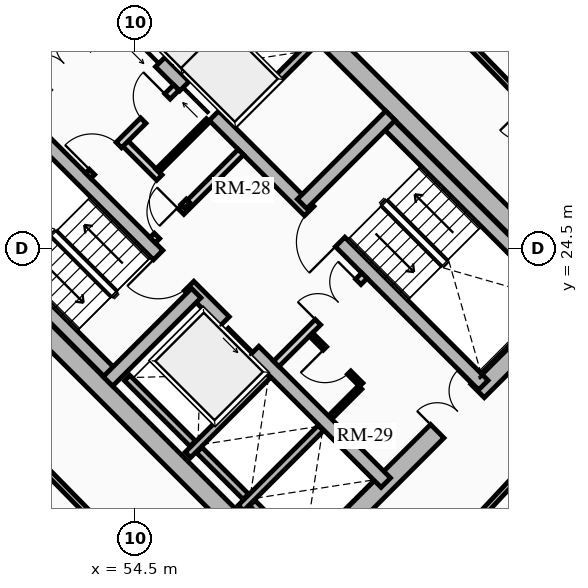
"""IFC4 building model, lengths in metres.
Left out: names, types, materials, properties, quantities, classifications, styles, units other than length and angle.
Written with IfcOpenShell. Run it as: python <this file> out.ifc"""

import sys

from ifc_helpers import new_model, si_unit, direction, frame, frame_2d, origin, place, context, subcontext, project, spatial, rectangle, extrude, source, transform, mapped, element, fill, save


model = new_model("IFC4")
c1 = context("Model", 3, precision=1e-05, world=origin(), true_north=direction((0.0, 1.0)))
c2 = subcontext(c1, "Body", "Model", "MODEL_VIEW")
j1 = project(units=[si_unit("LENGTHUNIT", "METRE"), si_unit("PLANEANGLEUNIT", "RADIAN")], contexts=[c1])
p1 = place(None, origin())
s1 = spatial("IfcSite", under=j1, at=p1, CompositionType="ELEMENT")
p2 = place(p1, origin())
s2 = spatial("IfcBuilding", under=s1, at=p2, CompositionType="ELEMENT")
p3 = place(p2, frame((0.0, 0.0, 51.1)))
s3 = spatial("IfcBuildingStorey", under=s2, at=p3, CompositionType="ELEMENT", Elevation=51.1)
for number, where, z_axis, x_axis in (
    (1, (58.773, 15.661, 0.0), (0.0, 0.0, 1.0), (-0.707, 0.707, 0.0)),
    (2, (66.339, 23.227, 0.0), (0.0, 0.0, 1.0), (-0.707, 0.707, 0.0)),
):
    element("IfcWall", number, at=place(p3, frame(where, z_axis=z_axis, x_axis=x_axis)), inside=s3, PredefinedType="SHEAR", context=c2, shape_type="SweptSolid", body=[
        extrude(rectangle(XDim=14.3, YDim=0.5, at=frame_2d((7.15, 0.0))), origin(), (0.0, 0.0, 1.0), 2.91),
    ])
p4 = place(p3, frame((58.596, 15.838, 0.0), z_axis=(0.0, 0.0, 1.0), x_axis=(0.707106781187, 0.707106781187, 0.0)))
e3 = element("IfcWall", 3, at=p4, inside=s3, PredefinedType="SHEAR", context=c2, shape_type="SweptSolid", body=[
    extrude(rectangle(XDim=10.7, YDim=0.5, at=frame_2d((5.35, 0.0))), origin(), (0.0, 0.0, 1.0), 2.91),
])
m1 = source(origin(), c2, "Body", "SweptSolid", [
    extrude(rectangle(XDim=1.5, YDim=2.02, at=frame_2d((0.75, 1.01))), frame((0.0, 0.26, 0.0), z_axis=(0.0, -1.0, 0.0), x_axis=(1.0, 0.0, 0.0)), (0.0, 0.0, 1.0), 0.52),
])
p5 = place(p4, frame((5.45, 0.0, 0.0)))
e4 = element("IfcOpeningElement", 4, at=p5, cuts=e3, PredefinedType="OPENING", context=c2, shape_type="MappedRepresentation", body=[
    mapped(m1, transform((0.0, 0.0, 0.0), x_axis=(1.0, 0.0, 0.0), y_axis=(0.0, 1.0, 0.0), z_axis=(0.0, 0.0, 1.0), scale=1.0)),
])
p6 = place(p3, frame((48.838, 25.596, 0.0), z_axis=(0.0, 0.0, 1.0), x_axis=(0.707106781187, 0.707106781187, 0.0)))
e5 = element("IfcWall", 5, at=p6, inside=s3, PredefinedType="SHEAR", context=c2, shape_type="SweptSolid", body=[
    extrude(rectangle(XDim=10.7, YDim=0.5, at=frame_2d((5.35, 0.0))), origin(), (0.0, 0.0, 1.0), 2.91),
])
p7 = place(p6, frame((4.6, 0.0, 0.0)))
e6 = element("IfcOpeningElement", 6, at=p7, cuts=e5, PredefinedType="OPENING", context=c2, shape_type="MappedRepresentation", body=[
    mapped(m1, transform((0.0, 0.0, 0.0), x_axis=(1.0, 0.0, 0.0), y_axis=(0.0, 1.0, 0.0), z_axis=(0.0, 0.0, 1.0), scale=1.0)),
])
p8 = place(p3, frame((61.096, 18.338, 0.0), z_axis=(0.0, 0.0, 1.0), x_axis=(-0.707106781187, 0.707106781187, 0.0)))
e7 = element("IfcWall", 7, at=p8, inside=s3, PredefinedType="SHEAR", context=c2, shape_type="SweptSolid", body=[
    extrude(rectangle(XDim=13.8, YDim=0.35, at=frame_2d((6.9, 0.0))), origin(), (0.0, 0.0, 1.0), 2.91),
])
m2 = source(origin(), c2, "Body", "SweptSolid", [
    extrude(rectangle(XDim=1.1, YDim=2.015, at=frame_2d((0.55, 1.007))), frame((0.0, 0.185, 0.0), z_axis=(0.0, -1.0, 0.0), x_axis=(1.0, 0.0, 0.0)), (0.0, 0.0, 1.0), 0.37),
])
p9 = place(p8, frame((4.9, 0.0, 0.0)))
e8 = element("IfcOpeningElement", 8, at=p9, cuts=e7, PredefinedType="OPENING", context=c2, shape_type="MappedRepresentation", body=[
    mapped(m2, transform((0.0, 0.0, 0.0), x_axis=(1.0, 0.0, 0.0), y_axis=(0.0, 1.0, 0.0), z_axis=(0.0, 0.0, 1.0), scale=1.0)),
])
m3 = source(origin(), c2, "Body", "SweptSolid", [
    extrude(rectangle(XDim=1.15, YDim=2.02, at=frame_2d((0.575, 1.01))), frame((0.0, 0.185, 0.0), z_axis=(0.0, -1.0, 0.0), x_axis=(1.0, 0.0, 0.0)), (0.0, 0.0, 1.0), 0.37),
])
p10 = place(p8, frame((7.32, 0.0, 0.0)))
e9 = element("IfcOpeningElement", 9, at=p10, cuts=e7, PredefinedType="OPENING", context=c2, shape_type="MappedRepresentation", body=[
    mapped(m3, transform((0.0, 0.0, 0.0), x_axis=(1.0, 0.0, 0.0), y_axis=(0.0, 1.0, 0.0), z_axis=(0.0, 0.0, 1.0), scale=1.0)),
])
p11 = place(p3, frame((63.662, 20.904, 0.0), z_axis=(0.0, 0.0, 1.0), x_axis=(-0.707106781187, 0.707106781187, 0.0)))
e10 = element("IfcWall", 10, at=p11, inside=s3, PredefinedType="SHEAR", context=c2, shape_type="SweptSolid", body=[
    extrude(rectangle(XDim=13.8, YDim=0.35, at=frame_2d((6.9, 0.0))), origin(), (0.0, 0.0, 1.0), 2.91),
])
p12 = place(p11, frame((10.025, 0.0, 0.0)))
e11 = element("IfcOpeningElement", 11, at=p12, cuts=e10, PredefinedType="OPENING", context=c2, shape_type="MappedRepresentation", body=[
    mapped(m2, transform((0.0, 0.0, 0.0), x_axis=(1.0, 0.0, 0.0), y_axis=(0.0, 1.0, 0.0), z_axis=(0.0, 0.0, 1.0), scale=1.0)),
])
p13 = place(p11, frame((12.025, 0.0, 0.0)))
e12 = element("IfcOpeningElement", 12, at=p13, cuts=e10, PredefinedType="OPENING", context=c2, shape_type="MappedRepresentation", body=[
    mapped(m2, transform((0.0, 0.0, 0.0), x_axis=(1.0, 0.0, 0.0), y_axis=(0.0, 1.0, 0.0), z_axis=(0.0, 0.0, 1.0), scale=1.0)),
])
p14 = place(p11, frame((5.33, 0.0, 0.0)))
e13 = element("IfcOpeningElement", 13, at=p14, cuts=e10, PredefinedType="OPENING", context=c2, shape_type="MappedRepresentation", body=[
    mapped(m3, transform((0.0, 0.0, 0.0), x_axis=(1.0, 0.0, 0.0), y_axis=(0.0, 1.0, 0.0), z_axis=(0.0, 0.0, 1.0), scale=1.0)),
])
p15 = place(p3, frame((53.922, 21.141, 0.0), z_axis=(0.0, 0.0, 1.0), x_axis=(-0.707106781187, 0.707106781187, 0.0)))
e14 = element("IfcWall", 14, at=p15, inside=s3, PredefinedType="SHEAR", context=c2, shape_type="SweptSolid", body=[
    extrude(rectangle(XDim=6.745, YDim=0.35, at=frame_2d((3.373, 0.0))), origin(), (0.0, 0.0, 1.0), 2.91),
])
p16 = place(p3, frame((53.784, 21.003, 0.0), z_axis=(0.0, 0.0, 1.0), x_axis=(0.707106781187, 0.707106781187, 0.0)))
e15 = element("IfcWall", 15, at=p16, inside=s3, PredefinedType="SHEAR", context=c2, shape_type="SweptSolid", body=[
    extrude(rectangle(XDim=3.285, YDim=0.35, at=frame_2d((1.643, 0.0))), origin(), (0.0, 0.0, 1.0), 2.91),
])
p17 = place(p3, frame((65.847, 23.089, 0.0), z_axis=(0.0, 0.0, 1.0), x_axis=(-0.707106781187, 0.707106781187, 0.0)))
e16 = element("IfcWall", 16, at=p17, inside=s3, PredefinedType="SHEAR", context=c2, shape_type="SweptSolid", body=[
    extrude(rectangle(XDim=6.745, YDim=0.35, at=frame_2d((3.373, 0.0))), origin(), (0.0, 0.0, 1.0), 2.91),
])
p18 = place(p3, frame((58.893, 25.674, 0.0), z_axis=(0.0, 0.0, 1.0), x_axis=(0.707106781187, 0.707106781187, 0.0)))
e17 = element("IfcWall", 17, at=p18, inside=s3, PredefinedType="SHEAR", context=c2, shape_type="SweptSolid", body=[
    extrude(rectangle(XDim=3.285, YDim=0.35, at=frame_2d((1.643, 0.0))), origin(), (0.0, 0.0, 1.0), 2.91),
])
p19 = place(p3, frame((55.888, 19.069, 0.0), z_axis=(0.0, 0.0, 1.0), x_axis=(0.707106781187, 0.707106781187, 0.0)))
e18 = element("IfcWall", 18, at=p19, inside=s3, PredefinedType="SHEAR", context=c2, shape_type="SweptSolid", body=[
    extrude(rectangle(XDim=2.97, YDim=0.2, at=frame_2d((1.485, 0.0))), origin(), (0.0, 0.0, 1.0), 2.91),
])
p20 = place(p3, frame((56.015, 19.366, 0.0), z_axis=(0.0, 0.0, 1.0), x_axis=(-0.707106781187, 0.707106781187, 0.0)))
e19 = element("IfcWall", 19, at=p20, inside=s3, PredefinedType="SHEAR", context=c2, shape_type="SweptSolid", body=[
    extrude(rectangle(XDim=2.44, YDim=0.2, at=frame_2d((1.22, 0.0))), origin(), (0.0, 0.0, 1.0), 2.91),
])
p21 = place(p3, frame((57.284, 17.673, 0.0), z_axis=(0.0, 0.0, 1.0), x_axis=(0.707147878904, 0.70706568108, 0.0)))
e20 = element("IfcWall", 20, at=p21, inside=s3, PredefinedType="SHEAR", context=c2, shape_type="SweptSolid", body=[
    extrude(rectangle(XDim=2.97, YDim=0.2, at=frame_2d((1.485, 0.0))), origin(), (0.0, 0.0, 1.0), 2.91),
])
p22 = place(p3, frame((57.412, 17.97, 0.0), z_axis=(0.0, 0.0, 1.0), x_axis=(-0.707106781187, 0.707106781187, 0.0)))
e21 = element("IfcWall", 21, at=p22, inside=s3, PredefinedType="SHEAR", context=c2, shape_type="SweptSolid", body=[
    extrude(rectangle(XDim=1.735, YDim=0.2, at=frame_2d((0.867, 0.0))), origin(), (0.0, 0.0, 1.0), 2.91),
])
p23 = place(p3, frame((58.737, 16.644, 0.0), z_axis=(0.0, 0.0, 1.0), x_axis=(-0.707032117043, 0.707181437447, 0.0)))
e22 = element("IfcWall", 22, at=p23, inside=s3, PredefinedType="SHEAR", context=c2, shape_type="SweptSolid", body=[
    extrude(rectangle(XDim=1.635, YDim=0.2, at=frame_2d((0.817, 0.0))), origin(), (0.0, 0.0, 1.0), 2.91),
])
p24 = place(p3, frame((57.062, 27.781, 0.0), z_axis=(0.0, 0.0, 1.0), x_axis=(0.707106781187, 0.707106781187, 0.0)))
e23 = element("IfcWall", 23, at=p24, inside=s3, PredefinedType="SHEAR", context=c2, shape_type="SweptSolid", body=[
    extrude(rectangle(XDim=2.97, YDim=0.2, at=frame_2d((1.485, 0.0))), origin(), (0.0, 0.0, 1.0), 2.91),
])
p25 = place(p3, frame((55.615, 29.227, 0.0), z_axis=(0.0, 0.0, 1.0), x_axis=(0.707147878904, 0.70706568108, 0.0)))
e24 = element("IfcWall", 24, at=p25, inside=s3, PredefinedType="SHEAR", context=c2, shape_type="SweptSolid", body=[
    extrude(rectangle(XDim=2.97, YDim=0.2, at=frame_2d((1.485, 0.0))), origin(), (0.0, 0.0, 1.0), 2.91),
])
p26 = place(p3, frame((58.214, 21.467, 0.0), z_axis=(0.0, 0.0, 1.0), x_axis=(0.707106781187, 0.707106781187, 0.0)))
e25 = element("IfcWall", 25, at=p26, inside=s3, PredefinedType="PARTITIONING", context=c2, shape_type="SweptSolid", body=[
    extrude(rectangle(XDim=3.28, YDim=0.2, at=frame_2d((1.64, 0.0))), origin(), (0.0, 0.0, 1.0), 2.635),
])
m4 = source(origin(), c2, "Body", "SweptSolid", [
    extrude(rectangle(XDim=1.5, YDim=2.02, at=frame_2d((0.75, 1.01))), frame((0.0, 0.11, 0.0), z_axis=(0.0, -1.0, 0.0), x_axis=(1.0, 0.0, 0.0)), (0.0, 0.0, 1.0), 0.22),
])
p27 = place(p26, frame((1.55, 0.0, 0.0)))
e26 = element("IfcOpeningElement", 26, at=p27, cuts=e25, PredefinedType="OPENING", context=c2, shape_type="MappedRepresentation", body=[
    mapped(m4, transform((0.0, 0.0, 0.0), x_axis=(1.0, 0.0, 0.0), y_axis=(0.0, 1.0, 0.0), z_axis=(0.0, 0.0, 1.0), scale=1.0)),
])
p28 = place(p3, frame((54.961, 24.719, 0.0), z_axis=(0.0, 0.0, 1.0), x_axis=(0.707106781187, 0.707106781187, 0.0)))
e27 = element("IfcWall", 27, at=p28, inside=s3, PredefinedType="PARTITIONING", context=c2, shape_type="SweptSolid", body=[
    extrude(rectangle(XDim=3.28, YDim=0.2, at=frame_2d((1.64, 0.0))), origin(), (0.0, 0.0, 1.0), 2.635),
])
m5 = source(origin(), c2, "Body", "SweptSolid", [
    extrude(rectangle(XDim=0.9, YDim=2.005, at=frame_2d((0.45, 1.002))), frame((0.0, 0.11, 0.0), z_axis=(0.0, -1.0, 0.0), x_axis=(1.0, 0.0, 0.0)), (0.0, 0.0, 1.0), 0.22),
])
p29 = place(p28, frame((0.16, 0.0, 0.0)))
e28 = element("IfcOpeningElement", 28, at=p29, cuts=e27, PredefinedType="OPENING", context=c2, shape_type="MappedRepresentation", body=[
    mapped(m5, transform((0.0, 0.0, 0.0), x_axis=(1.0, 0.0, 0.0), y_axis=(0.0, 1.0, 0.0), z_axis=(0.0, 0.0, 1.0), scale=1.0)),
])
p30 = place(p3, frame((55.874, 25.631, 0.0), z_axis=(0.0, 0.0, 1.0), x_axis=(-0.707157639372, 0.707055919343, 0.0)))
e29 = element("IfcWall", 29, at=p30, inside=s3, PredefinedType="PARTITIONING", context=c2, shape_type="SweptSolid", body=[
    extrude(rectangle(XDim=2.4, YDim=0.2, at=frame_2d((1.2, 0.0))), origin(), (0.0, 0.0, 1.0), 2.635),
])
p31 = place(p30, frame((0.14, 0.0, 0.0)))
e30 = element("IfcOpeningElement", 30, at=p31, cuts=e29, PredefinedType="OPENING", context=c2, shape_type="MappedRepresentation", body=[
    mapped(m5, transform((0.0, 0.0, 0.0), x_axis=(1.0, 0.0, 0.0), y_axis=(0.0, 1.0, 0.0), z_axis=(0.0, 0.0, 1.0), scale=1.0)),
])
p32 = place(p3, frame((53.264, 26.416, 0.0), z_axis=(0.0, 0.0, 1.0), x_axis=(0.707106781187, 0.707106781187, 0.0)))
e31 = element("IfcWall", 31, at=p32, inside=s3, PredefinedType="PARTITIONING", context=c2, shape_type="SweptSolid", body=[
    extrude(rectangle(XDim=3.28, YDim=0.2, at=frame_2d((1.64, 0.0))), origin(), (0.0, 0.0, 1.0), 2.635),
])
m6 = source(origin(), c2, "Body", "SweptSolid", [
    extrude(rectangle(XDim=1.0, YDim=2.015, at=frame_2d((0.5, 1.007))), frame((0.0, 0.11, 0.0), z_axis=(0.0, -1.0, 0.0), x_axis=(1.0, 0.0, 0.0)), (0.0, 0.0, 1.0), 0.22),
])
p33 = place(p32, frame((0.14, 0.0, 0.0)))
e32 = element("IfcOpeningElement", 32, at=p33, cuts=e31, PredefinedType="OPENING", context=c2, shape_type="MappedRepresentation", body=[
    mapped(m6, transform((0.0, 0.0, 0.0), x_axis=(1.0, 0.0, 0.0), y_axis=(0.0, 1.0, 0.0), z_axis=(0.0, 0.0, 1.0), scale=1.0)),
])
p34 = place(p32, frame((2.05, 0.0, 0.0)))
e33 = element("IfcOpeningElement", 33, at=p34, cuts=e31, PredefinedType="OPENING", context=c2, shape_type="MappedRepresentation", body=[
    mapped(m5, transform((0.0, 0.0, 0.0), x_axis=(1.0, 0.0, 0.0), y_axis=(0.0, 1.0, 0.0), z_axis=(0.0, 0.0, 1.0), scale=1.0)),
])
p35 = place(p3, frame((60.448, 20.915, 0.0), z_axis=(0.0, 0.0, 1.0), x_axis=(-0.707106781187, 0.707106781187, 0.0)))
e34 = element("IfcWall", 34, at=p35, inside=s3, PredefinedType="PARTITIONING", context=c2, shape_type="SweptSolid", body=[
    extrude(rectangle(XDim=1.87, YDim=0.125, at=frame_2d((0.935, 0.0))), origin(), (0.0, 0.0, 1.0), 2.635),
])
m7 = source(origin(), c2, "Body", "SweptSolid", [
    extrude(rectangle(XDim=0.9, YDim=2.005, at=frame_2d((0.45, 1.002))), frame((0.0, 0.073, 0.0), z_axis=(0.0, -1.0, 0.0), x_axis=(1.0, 0.0, 0.0)), (0.0, 0.0, 1.0), 0.145),
])
p36 = place(p35, frame((0.45, 0.0, 0.0)))
e35 = element("IfcOpeningElement", 35, at=p36, cuts=e34, PredefinedType="OPENING", context=c2, shape_type="MappedRepresentation", body=[
    mapped(m7, transform((0.0, 0.0, 0.0), x_axis=(1.0, 0.0, 0.0), y_axis=(0.0, 1.0, 0.0), z_axis=(0.0, 0.0, 1.0), scale=1.0)),
])
p37 = place(p3, frame((59.643, 20.066, 0.0), z_axis=(0.0, 0.0, 1.0), x_axis=(0.707106781187, 0.707106781187, 0.0)))
e36 = element("IfcWall", 36, at=p37, inside=s3, PredefinedType="PARTITIONING", context=c2, shape_type="SweptSolid", body=[
    extrude(rectangle(XDim=1.1, YDim=0.125, at=frame_2d((0.55, 0.0))), origin(), (0.0, 0.0, 1.0), 2.635),
])
p38 = place(p3, frame((55.089, 26.543, 0.0), z_axis=(0.0, 0.0, 1.0), x_axis=(0.707106781187, 0.707106781187, 0.0)))
e37 = element("IfcWall", 37, at=p38, inside=s3, PredefinedType="PARTITIONING", context=c2, shape_type="SweptSolid", body=[
    extrude(rectangle(XDim=1.88, YDim=0.125, at=frame_2d((0.94, 0.0))), origin(), (0.0, 0.0, 1.0), 2.635),
])
p39 = place(p3, frame((51.914, 18.914, 0.0), z_axis=(0.0, 0.0, 1.0), x_axis=(0.6999614951, -0.71418058317, 0.0)))
e38 = element("IfcWall", 38, at=p39, inside=s3, PredefinedType="PARTITIONING", context=c2, shape_type="SweptSolid", body=[
    extrude(rectangle(XDim=6.13, YDim=0.15, at=frame_2d((3.065, 0.0))), origin(), (0.0, 0.0, 1.0), 2.159),
])
m8 = source(origin(), c2, "Body", "SweptSolid", [
    extrude(rectangle(XDim=1.05, YDim=2.015, at=frame_2d((0.525, 1.007))), frame((0.0, 0.085, 0.0), z_axis=(0.0, -1.0, 0.0), x_axis=(1.0, 0.0, 0.0)), (0.0, 0.0, 1.0), 0.17),
])
p40 = place(p39, frame((2.54, 0.0, 0.0)))
e39 = element("IfcOpeningElement", 39, at=p40, cuts=e38, PredefinedType="OPENING", context=c2, shape_type="MappedRepresentation", body=[
    mapped(m8, transform((0.0, 0.0, 0.0), x_axis=(1.0, 0.0, 0.0), y_axis=(0.0, 1.0, 0.0), z_axis=(0.0, 0.0, 1.0), scale=1.0)),
])
p41 = place(p3, frame((62.867, 16.702, 0.0), z_axis=(0.0, 0.0, 1.0), x_axis=(0.682449206191, 0.73093302085, 0.0)))
e40 = element("IfcWall", 40, at=p41, inside=s3, PredefinedType="PARTITIONING", context=c2, shape_type="SweptSolid", body=[
    extrude(rectangle(XDim=6.642, YDim=0.15, at=frame_2d((3.321, 0.0))), origin(), (0.0, 0.0, 1.0), 2.159),
])
p42 = place(p3, frame((67.247, 25.802, 0.0), z_axis=(0.0, 0.0, 1.0), x_axis=(-0.696771261687, 0.71729339108, 0.0)))
e41 = element("IfcWall", 41, at=p42, inside=s3, PredefinedType="PARTITIONING", context=c2, shape_type="SweptSolid", body=[
    extrude(rectangle(XDim=5.972, YDim=0.15, at=frame_2d((2.986, 0.0))), origin(), (0.0, 0.0, 1.0), 2.635),
])
m9 = source(origin(), c2, "Body", "SweptSolid", [
    extrude(rectangle(XDim=1.0, YDim=2.015, at=frame_2d((0.5, 1.007))), frame((0.0, 0.085, 0.0), z_axis=(0.0, -1.0, 0.0), x_axis=(1.0, 0.0, 0.0)), (0.0, 0.0, 1.0), 0.17),
])
p43 = place(p42, frame((2.486, 0.0, 0.0)))
e42 = element("IfcOpeningElement", 42, at=p43, cuts=e41, PredefinedType="OPENING", context=c2, shape_type="MappedRepresentation", body=[
    mapped(m9, transform((0.0, 0.0, 0.0), x_axis=(1.0, 0.0, 0.0), y_axis=(0.0, 1.0, 0.0), z_axis=(0.0, 0.0, 1.0), scale=1.0)),
])
m10 = source(origin(), c2, "Body", "SweptSolid", [
    extrude(rectangle(XDim=1.1, YDim=2.015, at=frame_2d((0.55, 1.007))), frame((0.0, 0.025, 0.0), z_axis=(0.0, -1.0, 0.0), x_axis=(1.0, 0.0, 0.0)), (0.0, 0.0, 1.0), 0.05),
])
p44 = place(p9, origin())
e43 = element("IfcDoor", 43, at=p44, inside=s3, OperationType="SLIDING_TO_LEFT", PredefinedType="DOOR", context=c2, shape_type="MappedRepresentation", body=[
    mapped(m10, transform((0.0, 0.0, 0.0), x_axis=(1.0, 0.0, 0.0), y_axis=(0.0, 1.0, 0.0), z_axis=(0.0, 0.0, 1.0), scale=1.0)),
])
fill(e8, e43)
p45 = place(p12, origin())
e44 = element("IfcDoor", 44, at=p45, inside=s3, OperationType="SLIDING_TO_RIGHT", PredefinedType="DOOR", context=c2, shape_type="MappedRepresentation", body=[
    mapped(m10, transform((0.0, 0.0, 0.0), x_axis=(1.0, 0.0, 0.0), y_axis=(0.0, 1.0, 0.0), z_axis=(0.0, 0.0, 1.0), scale=1.0)),
])
fill(e11, e44)
p46 = place(p13, origin())
e45 = element("IfcDoor", 45, at=p46, inside=s3, OperationType="SLIDING_TO_LEFT", PredefinedType="DOOR", context=c2, shape_type="MappedRepresentation", body=[
    mapped(m10, transform((0.0, 0.0, 0.0), x_axis=(1.0, 0.0, 0.0), y_axis=(0.0, 1.0, 0.0), z_axis=(0.0, 0.0, 1.0), scale=1.0)),
])
fill(e12, e45)
m11 = source(origin(), c2, "Body", "SweptSolid", [
    extrude(rectangle(XDim=1.15, YDim=2.02, at=frame_2d((0.575, 1.01))), frame((0.0, 0.025, 0.0), z_axis=(0.0, -1.0, 0.0), x_axis=(1.0, 0.0, 0.0)), (0.0, 0.0, 1.0), 0.05),
])
p47 = place(p10, origin())
e46 = element("IfcDoor", 46, at=p47, inside=s3, OperationType="SINGLE_SWING_RIGHT", PredefinedType="DOOR", context=c2, shape_type="MappedRepresentation", body=[
    mapped(m11, transform((0.0, 0.0, 0.0), x_axis=(1.0, 0.0, 0.0), y_axis=(0.0, 1.0, 0.0), z_axis=(0.0, 0.0, 1.0), scale=1.0)),
])
fill(e9, e46)
p48 = place(p14, origin())
e47 = element("IfcDoor", 47, at=p48, inside=s3, OperationType="SINGLE_SWING_LEFT", PredefinedType="DOOR", context=c2, shape_type="MappedRepresentation", body=[
    mapped(m11, transform((0.0, 0.0, 0.0), x_axis=(1.0, 0.0, 0.0), y_axis=(0.0, 1.0, 0.0), z_axis=(0.0, 0.0, 1.0), scale=1.0)),
])
fill(e13, e47)
m12 = source(origin(), c2, "Body", "SweptSolid", [
    extrude(rectangle(XDim=1.5, YDim=2.02, at=frame_2d((0.75, 1.01))), frame((0.0, 0.025, 0.0), z_axis=(0.0, -1.0, 0.0), x_axis=(1.0, 0.0, 0.0)), (0.0, 0.0, 1.0), 0.05),
])
p49 = place(p7, origin())
e48 = element("IfcDoor", 48, at=p49, inside=s3, OperationType="DOUBLE_DOOR_SINGLE_SWING", PredefinedType="DOOR", context=c2, shape_type="MappedRepresentation", body=[
    mapped(m12, transform((0.0, 0.0, 0.0), x_axis=(1.0, 0.0, 0.0), y_axis=(0.0, 1.0, 0.0), z_axis=(0.0, 0.0, 1.0), scale=1.0)),
])
fill(e6, e48)
p50 = place(p5, origin())
e49 = element("IfcDoor", 49, at=p50, inside=s3, OperationType="DOUBLE_DOOR_SINGLE_SWING", PredefinedType="DOOR", context=c2, shape_type="MappedRepresentation", body=[
    mapped(m12, transform((0.0, 0.0, 0.0), x_axis=(1.0, 0.0, 0.0), y_axis=(0.0, 1.0, 0.0), z_axis=(0.0, 0.0, 1.0), scale=1.0)),
])
fill(e4, e49)
p51 = place(p27, origin())
e50 = element("IfcDoor", 50, at=p51, inside=s3, OperationType="DOUBLE_DOOR_SINGLE_SWING", PredefinedType="DOOR", context=c2, shape_type="MappedRepresentation", body=[
    mapped(m12, transform((0.0, 0.0, 0.0), x_axis=(1.0, 0.0, 0.0), y_axis=(0.0, 1.0, 0.0), z_axis=(0.0, 0.0, 1.0), scale=1.0)),
])
fill(e26, e50)
m13 = source(origin(), c2, "Body", "SweptSolid", [
    extrude(rectangle(XDim=0.9, YDim=2.005, at=frame_2d((0.45, 1.002))), frame((0.0, 0.025, 0.0), z_axis=(0.0, -1.0, 0.0), x_axis=(1.0, 0.0, 0.0)), (0.0, 0.0, 1.0), 0.05),
])
p52 = place(p29, origin())
e51 = element("IfcDoor", 51, at=p52, inside=s3, OperationType="SINGLE_SWING_RIGHT", PredefinedType="DOOR", context=c2, shape_type="MappedRepresentation", body=[
    mapped(m13, transform((0.0, 0.0, 0.0), x_axis=(1.0, 0.0, 0.0), y_axis=(0.0, 1.0, 0.0), z_axis=(0.0, 0.0, 1.0), scale=1.0)),
])
fill(e28, e51)
m14 = source(origin(), c2, "Body", "SweptSolid", [
    extrude(rectangle(XDim=1.0, YDim=2.015, at=frame_2d((0.5, 1.007))), frame((0.0, 0.025, 0.0), z_axis=(0.0, -1.0, 0.0), x_axis=(1.0, 0.0, 0.0)), (0.0, 0.0, 1.0), 0.05),
])
p53 = place(p33, origin())
e52 = element("IfcDoor", 52, at=p53, inside=s3, OperationType="SINGLE_SWING_LEFT", PredefinedType="DOOR", context=c2, shape_type="MappedRepresentation", body=[
    mapped(m14, transform((0.0, 0.0, 0.0), x_axis=(1.0, 0.0, 0.0), y_axis=(0.0, 1.0, 0.0), z_axis=(0.0, 0.0, 1.0), scale=1.0)),
])
fill(e32, e52)
p54 = place(p36, origin())
e53 = element("IfcDoor", 53, at=p54, inside=s3, OperationType="SINGLE_SWING_RIGHT", PredefinedType="DOOR", context=c2, shape_type="MappedRepresentation", body=[
    mapped(m13, transform((0.0, 0.0, 0.0), x_axis=(1.0, 0.0, 0.0), y_axis=(0.0, 1.0, 0.0), z_axis=(0.0, 0.0, 1.0), scale=1.0)),
])
fill(e35, e53)
p55 = place(p31, origin())
e54 = element("IfcDoor", 54, at=p55, inside=s3, OperationType="SINGLE_SWING_LEFT", PredefinedType="DOOR", context=c2, shape_type="MappedRepresentation", body=[
    mapped(m13, transform((0.0, 0.0, 0.0), x_axis=(1.0, 0.0, 0.0), y_axis=(0.0, 1.0, 0.0), z_axis=(0.0, 0.0, 1.0), scale=1.0)),
])
fill(e30, e54)
p56 = place(p34, origin())
e55 = element("IfcDoor", 55, at=p56, inside=s3, OperationType="SINGLE_SWING_RIGHT", PredefinedType="DOOR", context=c2, shape_type="MappedRepresentation", body=[
    mapped(m13, transform((0.0, 0.0, 0.0), x_axis=(1.0, 0.0, 0.0), y_axis=(0.0, 1.0, 0.0), z_axis=(0.0, 0.0, 1.0), scale=1.0)),
])
fill(e33, e55)
save(model, sys.argv[1])
